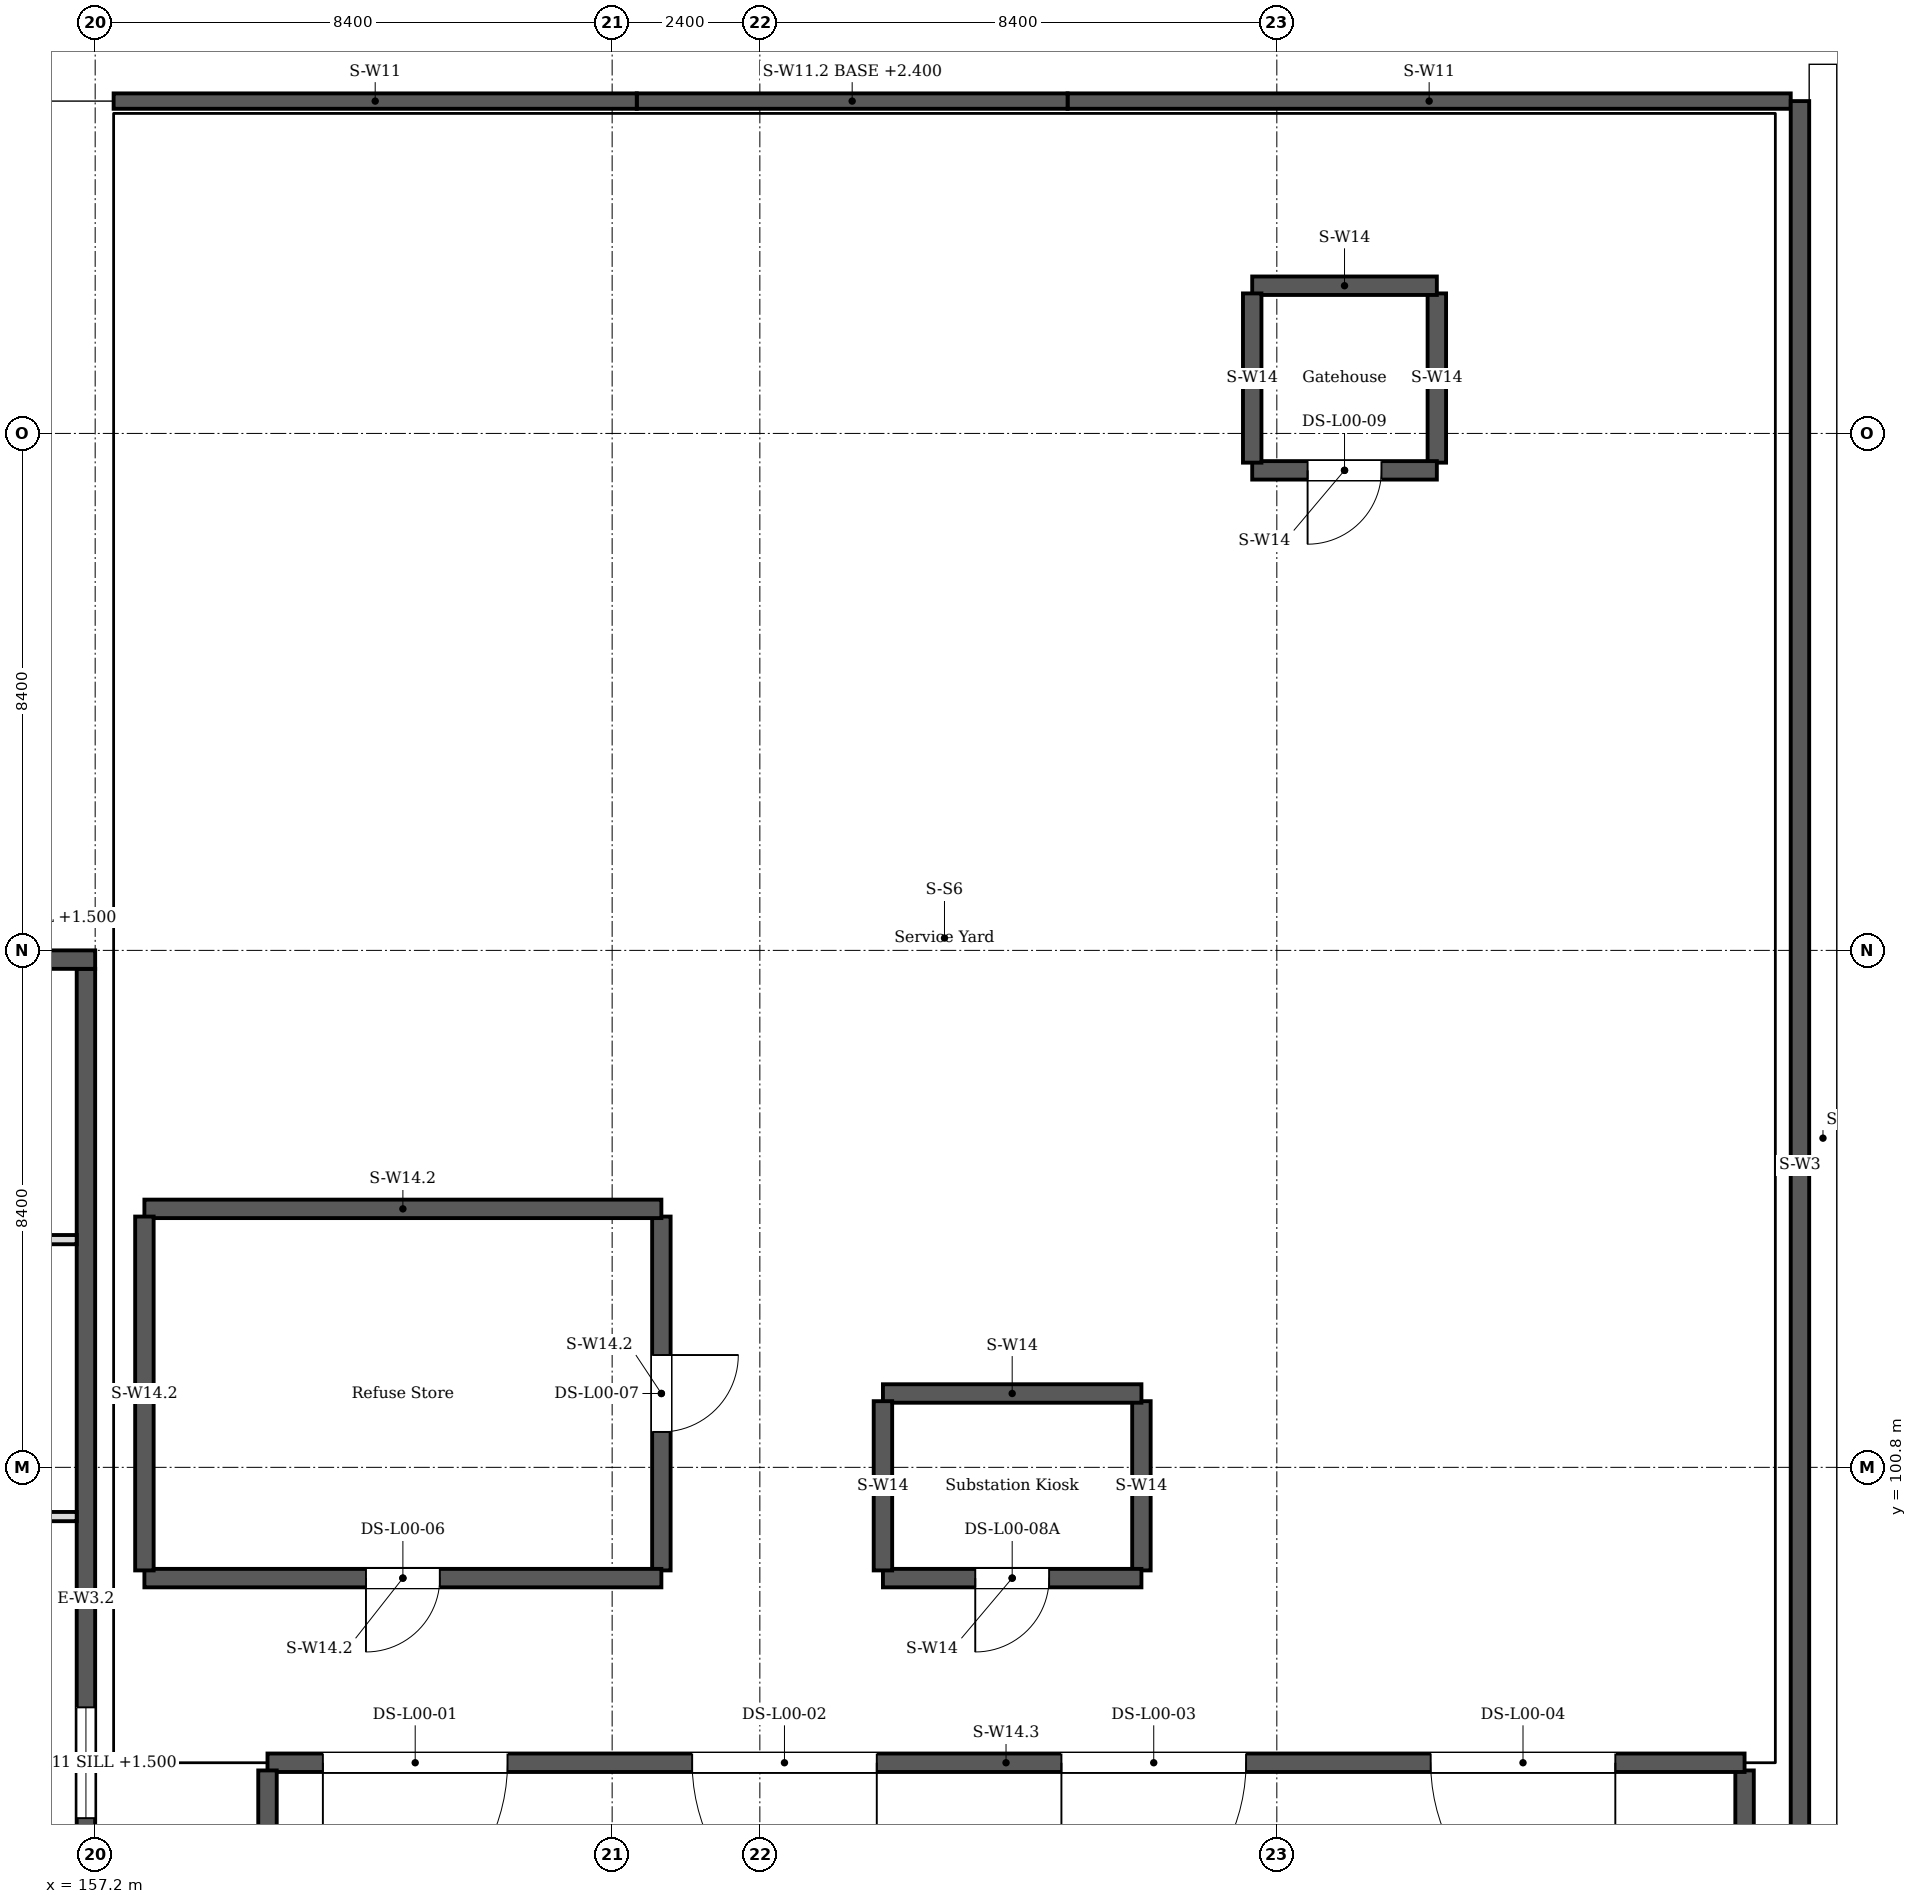
"""IFC4 building model, lengths in metres.
Left out: names, types, materials, properties, quantities, classifications, styles, units other than length and angle.
Written with IfcOpenShell. Run it as: python <this file> out.ifc"""

import sys

from ifc_helpers import new_model, si_unit, direction, frame, frame_2d, origin, place, context, subcontext, project, spatial, rectangle, extrude, element, fill, save


model = new_model("IFC4")
c1 = context("Model", 3, precision=1e-05, world=origin(), true_north=direction((0.0, 1.0)))
c2 = subcontext(c1, "Body", "Model", "MODEL_VIEW")
j1 = project(units=[si_unit("LENGTHUNIT", "METRE"), si_unit("PLANEANGLEUNIT", "RADIAN")], contexts=[c1])
p1 = place(None, origin())
s1 = spatial("IfcSite", under=j1, at=p1, CompositionType="ELEMENT")
p2 = place(p1, origin())
s2 = spatial("IfcBuilding", under=s1, at=p2, CompositionType="ELEMENT")
p3 = place(p2, origin())
s3 = spatial("IfcBuildingStorey", under=s2, at=p3, CompositionType="ELEMENT", Elevation=0.0)
p4 = place(p3, frame((184.9, 88.2, -1.2), z_axis=(0.0, 0.0, 1.0), x_axis=(0.0, 1.0, 0.0)))
e1 = element("IfcWall", 1, at=p4, inside=s3, PredefinedType="SOLIDWALL", context=c2, shape_type="SweptSolid", body=[
    extrude(rectangle(XDim=34.8, YDim=0.3, at=frame_2d((17.4, 0.0))), origin(), (0.0, 0.0, 1.0), 1.2),
])
p5 = place(p3, frame((160.0, 96.0, 0.0), z_axis=(0.0, 0.0, 1.0), x_axis=(1.0, 0.0, 0.0)))
e2 = element("IfcWall", 2, at=p5, inside=s3, PredefinedType="SOLIDWALL", context=c2, shape_type="SweptSolid", body=[
    extrude(rectangle(XDim=24.0, YDim=0.3, at=frame_2d((12.0, 0.0))), origin(), (0.0, 0.0, 1.0), 5.75),
])
p6 = place(p5, frame((0.9, 0.0, 0.0)))
e3 = element("IfcOpeningElement", 3, at=p6, cuts=e2, PredefinedType="OPENING", context=c2, shape_type="SweptSolid", body=[
    extrude(rectangle(XDim=3.0, YDim=3.6, at=frame_2d((1.5, 1.8))), frame((0.0, 0.16, 0.0), z_axis=(0.0, -1.0, 0.0), x_axis=(1.0, 0.0, 0.0)), (0.0, 0.0, 1.0), 0.32),
])
p7 = place(p5, frame((6.9, 0.0, 0.0)))
e4 = element("IfcOpeningElement", 4, at=p7, cuts=e2, PredefinedType="OPENING", context=c2, shape_type="SweptSolid", body=[
    extrude(rectangle(XDim=3.0, YDim=3.6, at=frame_2d((1.5, 1.8))), frame((0.0, 0.16, 0.0), z_axis=(0.0, -1.0, 0.0), x_axis=(1.0, 0.0, 0.0)), (0.0, 0.0, 1.0), 0.32),
])
p8 = place(p5, frame((12.9, 0.0, 0.0)))
e5 = element("IfcOpeningElement", 5, at=p8, cuts=e2, PredefinedType="OPENING", context=c2, shape_type="SweptSolid", body=[
    extrude(rectangle(XDim=3.0, YDim=3.6, at=frame_2d((1.5, 1.8))), frame((0.0, 0.16, 0.0), z_axis=(0.0, -1.0, 0.0), x_axis=(1.0, 0.0, 0.0)), (0.0, 0.0, 1.0), 0.32),
])
p9 = place(p5, frame((18.9, 0.0, 0.0)))
e6 = element("IfcOpeningElement", 6, at=p9, cuts=e2, PredefinedType="OPENING", context=c2, shape_type="SweptSolid", body=[
    extrude(rectangle(XDim=3.0, YDim=3.6, at=frame_2d((1.5, 1.8))), frame((0.0, 0.16, 0.0), z_axis=(0.0, -1.0, 0.0), x_axis=(1.0, 0.0, 0.0)), (0.0, 0.0, 1.0), 0.32),
])
p10 = place(p3, frame((160.0, 84.125, 0.0), z_axis=(0.0, 0.0, 1.0), x_axis=(0.0, 1.0, 0.0)))
e7 = element("IfcWall", 7, at=p10, inside=s3, PredefinedType="SOLIDWALL", context=c2, shape_type="SweptSolid", body=[
    extrude(rectangle(XDim=11.75, YDim=0.3, at=frame_2d((5.875, 0.0))), origin(), (0.0, 0.0, 1.0), 5.75),
])
p11 = place(p10, frame((5.25, 0.0, 0.0)))
e8 = element("IfcOpeningElement", 8, at=p11, cuts=e7, PredefinedType="OPENING", context=c2, shape_type="SweptSolid", body=[
    extrude(rectangle(XDim=1.25, YDim=2.1, at=frame_2d((0.625, 1.05))), frame((0.0, 0.16, 0.0), z_axis=(0.0, -1.0, 0.0), x_axis=(1.0, 0.0, 0.0)), (0.0, 0.0, 1.0), 0.32),
])
p12 = place(p3, frame((184.0, 84.125, 0.0), z_axis=(0.0, 0.0, 1.0), x_axis=(0.0, 1.0, 0.0)))
e9 = element("IfcWall", 9, at=p12, inside=s3, PredefinedType="SOLIDWALL", context=c2, shape_type="SweptSolid", body=[
    extrude(rectangle(XDim=11.75, YDim=0.3, at=frame_2d((5.875, 0.0))), origin(), (0.0, 0.0, 1.0), 5.75),
])
p13 = place(p3, frame((158.0, 99.0, 0.0), z_axis=(0.0, 0.0, 1.0), x_axis=(1.0, 0.0, 0.0)))
e10 = element("IfcWall", 10, at=p13, inside=s3, PredefinedType="SOLIDWALL", context=c2, shape_type="SweptSolid", body=[
    extrude(rectangle(XDim=8.4, YDim=0.3, at=frame_2d((4.2, 0.0))), origin(), (0.0, 0.0, 1.0), 3.4),
])
p14 = place(p13, frame((3.6, 0.0, 0.0)))
e11 = element("IfcOpeningElement", 11, at=p14, cuts=e10, PredefinedType="OPENING", context=c2, shape_type="SweptSolid", body=[
    extrude(rectangle(XDim=1.2, YDim=2.4, at=frame_2d((0.6, 1.2))), frame((0.0, 0.16, 0.0), z_axis=(0.0, -1.0, 0.0), x_axis=(1.0, 0.0, 0.0)), (0.0, 0.0, 1.0), 0.32),
])
p15 = place(p3, frame((158.0, 105.0, 0.0), z_axis=(0.0, 0.0, 1.0), x_axis=(1.0, 0.0, 0.0)))
e12 = element("IfcWall", 12, at=p15, inside=s3, PredefinedType="SOLIDWALL", context=c2, shape_type="SweptSolid", body=[
    extrude(rectangle(XDim=8.4, YDim=0.3, at=frame_2d((4.2, 0.0))), origin(), (0.0, 0.0, 1.0), 3.4),
])
p16 = place(p3, frame((158.0, 99.125, 0.0), z_axis=(0.0, 0.0, 1.0), x_axis=(0.0, 1.0, 0.0)))
e13 = element("IfcWall", 13, at=p16, inside=s3, PredefinedType="SOLIDWALL", context=c2, shape_type="SweptSolid", body=[
    extrude(rectangle(XDim=5.75, YDim=0.3, at=frame_2d((2.875, 0.0))), origin(), (0.0, 0.0, 1.0), 3.4),
])
p17 = place(p3, frame((166.4, 99.125, 0.0), z_axis=(0.0, 0.0, 1.0), x_axis=(0.0, 1.0, 0.0)))
e14 = element("IfcWall", 14, at=p17, inside=s3, PredefinedType="SOLIDWALL", context=c2, shape_type="SweptSolid", body=[
    extrude(rectangle(XDim=5.75, YDim=0.3, at=frame_2d((2.875, 0.0))), origin(), (0.0, 0.0, 1.0), 3.4),
])
p18 = place(p17, frame((2.25, 0.0, 0.0)))
e15 = element("IfcOpeningElement", 15, at=p18, cuts=e14, PredefinedType="OPENING", context=c2, shape_type="SweptSolid", body=[
    extrude(rectangle(XDim=1.25, YDim=2.1, at=frame_2d((0.625, 1.05))), frame((0.0, 0.16, 0.0), z_axis=(0.0, -1.0, 0.0), x_axis=(1.0, 0.0, 0.0)), (0.0, 0.0, 1.0), 0.32),
])
p19 = place(p3, frame((170.0, 99.0, 0.0), z_axis=(0.0, 0.0, 1.0), x_axis=(1.0, 0.0, 0.0)))
e16 = element("IfcWall", 16, at=p19, inside=s3, PredefinedType="SOLIDWALL", context=c2, shape_type="SweptSolid", body=[
    extrude(rectangle(XDim=4.2, YDim=0.3, at=frame_2d((2.1, 0.0))), origin(), (0.0, 0.0, 1.0), 2.8),
])
p20 = place(p19, frame((1.5, 0.0, 0.0)))
e17 = element("IfcOpeningElement", 17, at=p20, cuts=e16, PredefinedType="OPENING", context=c2, shape_type="SweptSolid", body=[
    extrude(rectangle(XDim=1.2, YDim=2.4, at=frame_2d((0.6, 1.2))), frame((0.0, 0.16, 0.0), z_axis=(0.0, -1.0, 0.0), x_axis=(1.0, 0.0, 0.0)), (0.0, 0.0, 1.0), 0.32),
])
p21 = place(p3, frame((170.0, 102.0, 0.0), z_axis=(0.0, 0.0, 1.0), x_axis=(1.0, 0.0, 0.0)))
e18 = element("IfcWall", 18, at=p21, inside=s3, PredefinedType="SOLIDWALL", context=c2, shape_type="SweptSolid", body=[
    extrude(rectangle(XDim=4.2, YDim=0.3, at=frame_2d((2.1, 0.0))), origin(), (0.0, 0.0, 1.0), 2.8),
])
for number, where, z_axis, x_axis in (
    (19, (170.0, 99.125, 0.0), (0.0, 0.0, 1.0), (0.0, 1.0, 0.0)),
    (20, (174.2, 99.125, 0.0), (0.0, 0.0, 1.0), (0.0, 1.0, 0.0)),
):
    element("IfcWall", number, at=place(p3, frame(where, z_axis=z_axis, x_axis=x_axis)), inside=s3, PredefinedType="SOLIDWALL", context=c2, shape_type="SweptSolid", body=[
        extrude(rectangle(XDim=2.75, YDim=0.3, at=frame_2d((1.375, 0.0))), origin(), (0.0, 0.0, 1.0), 2.8),
    ])
p22 = place(p3, frame((176.0, 117.0, 0.0), z_axis=(0.0, 0.0, 1.0), x_axis=(1.0, 0.0, 0.0)))
e21 = element("IfcWall", 21, at=p22, inside=s3, PredefinedType="SOLIDWALL", context=c2, shape_type="SweptSolid", body=[
    extrude(rectangle(XDim=3.0, YDim=0.3, at=frame_2d((1.5, 0.0))), origin(), (0.0, 0.0, 1.0), 2.8),
])
p23 = place(p22, frame((0.9, 0.0, 0.0)))
e22 = element("IfcOpeningElement", 22, at=p23, cuts=e21, PredefinedType="OPENING", context=c2, shape_type="SweptSolid", body=[
    extrude(rectangle(XDim=1.2, YDim=2.1, at=frame_2d((0.6, 1.05))), frame((0.0, 0.16, 0.0), z_axis=(0.0, -1.0, 0.0), x_axis=(1.0, 0.0, 0.0)), (0.0, 0.0, 1.0), 0.32),
])
p24 = place(p3, frame((176.0, 120.0, 0.0), z_axis=(0.0, 0.0, 1.0), x_axis=(1.0, 0.0, 0.0)))
e23 = element("IfcWall", 23, at=p24, inside=s3, PredefinedType="SOLIDWALL", context=c2, shape_type="SweptSolid", body=[
    extrude(rectangle(XDim=3.0, YDim=0.3, at=frame_2d((1.5, 0.0))), origin(), (0.0, 0.0, 1.0), 2.8),
])
for number, where, z_axis, x_axis in (
    (24, (176.0, 117.125, 0.0), (0.0, 0.0, 1.0), (0.0, 1.0, 0.0)),
    (25, (179.0, 117.125, 0.0), (0.0, 0.0, 1.0), (0.0, 1.0, 0.0)),
):
    element("IfcWall", number, at=place(p3, frame(where, z_axis=z_axis, x_axis=x_axis)), inside=s3, PredefinedType="SOLIDWALL", context=c2, shape_type="SweptSolid", body=[
        extrude(rectangle(XDim=2.75, YDim=0.3, at=frame_2d((1.375, 0.0))), origin(), (0.0, 0.0, 1.0), 2.8),
    ])
p25 = place(p3, frame((157.5, 123.0, -0.6), z_axis=(0.0, 0.0, 1.0), x_axis=(1.0, 0.0, 0.0)))
e26 = element("IfcWall", 26, at=p25, inside=s3, PredefinedType="SOLIDWALL", context=c2, shape_type="SweptSolid", body=[
    extrude(rectangle(XDim=8.5, YDim=0.25, at=frame_2d((4.25, 0.0))), origin(), (0.0, 0.0, 1.0), 3.0),
])
p26 = place(p3, frame((173.0, 123.0, -0.6), z_axis=(0.0, 0.0, 1.0), x_axis=(1.0, 0.0, 0.0)))
e27 = element("IfcWall", 27, at=p26, inside=s3, PredefinedType="SOLIDWALL", context=c2, shape_type="SweptSolid", body=[
    extrude(rectangle(XDim=11.75, YDim=0.25, at=frame_2d((5.875, 0.0))), origin(), (0.0, 0.0, 1.0), 3.0),
])
p27 = place(p3, frame((166.0, 123.0, 2.4), z_axis=(0.0, 0.0, 1.0), x_axis=(1.0, 0.0, 0.0)))
e28 = element("IfcWall", 28, at=p27, inside=s3, PredefinedType="SOLIDWALL", context=c2, shape_type="SweptSolid", body=[
    extrude(rectangle(XDim=7.0, YDim=0.25, at=frame_2d((3.5, 0.0))), origin(), (0.0, 0.0, 1.0), 0.6),
])
p28 = place(p3, frame((157.05, 84.0, 0.0), z_axis=(0.0, 0.0, 1.0), x_axis=(0.0, 1.0, 0.0)))
e29 = element("IfcWall", 29, at=p28, inside=s3, PredefinedType="SOLIDWALL", context=c2, shape_type="SweptSolid", body=[
    extrude(rectangle(XDim=24.9, YDim=0.3, at=frame_2d((12.45, 0.0))), origin(), (0.0, 0.0, 1.0), 5.72),
])
p29 = place(p28, frame((3.1, 0.0, 1.5)))
e30 = element("IfcOpeningElement", 30, at=p29, cuts=e29, PredefinedType="OPENING", context=c2, shape_type="SweptSolid", body=[
    extrude(rectangle(XDim=1.8, YDim=1.2, at=frame_2d((0.9, 0.6))), frame((0.0, 0.16, 0.0), z_axis=(0.0, -1.0, 0.0), x_axis=(1.0, 0.0, 0.0)), (0.0, 0.0, 1.0), 0.32),
])
p30 = place(p28, frame((11.1, 0.0, 1.5)))
e31 = element("IfcOpeningElement", 31, at=p30, cuts=e29, PredefinedType="OPENING", context=c2, shape_type="SweptSolid", body=[
    extrude(rectangle(XDim=1.8, YDim=1.2, at=frame_2d((0.9, 0.6))), frame((0.0, 0.16, 0.0), z_axis=(0.0, -1.0, 0.0), x_axis=(1.0, 0.0, 0.0)), (0.0, 0.0, 1.0), 0.32),
])
p31 = place(p3, frame((151.2, 109.05, 0.0), z_axis=(0.0, 0.0, 1.0), x_axis=(1.0, 0.0, 0.0)))
e32 = element("IfcWall", 32, at=p31, inside=s3, PredefinedType="SOLIDWALL", context=c2, shape_type="SweptSolid", body=[
    extrude(rectangle(XDim=6.0, YDim=0.3, at=frame_2d((3.0, 0.0))), origin(), (0.0, 0.0, 1.0), 5.72),
])
p32 = place(p31, frame((0.6, 0.0, 1.5)))
e33 = element("IfcOpeningElement", 33, at=p32, cuts=e32, PredefinedType="OPENING", context=c2, shape_type="SweptSolid", body=[
    extrude(rectangle(XDim=1.2, YDim=1.2, at=frame_2d((0.6, 0.6))), frame((0.0, 0.16, 0.0), z_axis=(0.0, -1.0, 0.0), x_axis=(1.0, 0.0, 0.0)), (0.0, 0.0, 1.0), 0.32),
])
p33 = place(p31, frame((3.7, 0.0, 1.5)))
e34 = element("IfcOpeningElement", 34, at=p33, cuts=e32, PredefinedType="OPENING", context=c2, shape_type="SweptSolid", body=[
    extrude(rectangle(XDim=1.2, YDim=1.2, at=frame_2d((0.6, 0.6))), frame((0.0, 0.16, 0.0), z_axis=(0.0, -1.0, 0.0), x_axis=(1.0, 0.0, 0.0)), (0.0, 0.0, 1.0), 0.32),
])
for number, where, z_axis, x_axis in (
    (35, (153.6, 100.0, 0.0), (0.0, 0.0, 1.0), (1.0, 0.0, 0.0)),
    (36, (153.6, 104.5, 0.0), (0.0, 0.0, 1.0), (1.0, 0.0, 0.0)),
):
    element("IfcWall", number, at=place(p3, frame(where, z_axis=z_axis, x_axis=x_axis)), inside=s3, PredefinedType="PARTITIONING", context=c2, shape_type="SweptSolid", body=[
        extrude(rectangle(XDim=3.3, YDim=0.15, at=frame_2d((1.65, 0.0))), origin(), (0.0, 0.0, 1.0), 5.72),
    ])
p34 = place(p6, origin())
e37 = element("IfcDoor", 37, at=p34, inside=s3, OperationType="ROLLINGUP", PredefinedType="DOOR", context=c2, shape_type="SweptSolid", body=[
    extrude(rectangle(XDim=3.0, YDim=3.6, at=frame_2d((1.5, 1.8))), frame((0.0, 0.025, 0.0), z_axis=(0.0, -1.0, 0.0), x_axis=(1.0, 0.0, 0.0)), (0.0, 0.0, 1.0), 0.05),
])
fill(e3, e37)
p35 = place(p7, origin())
e38 = element("IfcDoor", 38, at=p35, inside=s3, OperationType="ROLLINGUP", PredefinedType="DOOR", context=c2, shape_type="SweptSolid", body=[
    extrude(rectangle(XDim=3.0, YDim=3.6, at=frame_2d((1.5, 1.8))), frame((0.0, 0.025, 0.0), z_axis=(0.0, -1.0, 0.0), x_axis=(1.0, 0.0, 0.0)), (0.0, 0.0, 1.0), 0.05),
])
fill(e4, e38)
p36 = place(p8, origin())
e39 = element("IfcDoor", 39, at=p36, inside=s3, OperationType="ROLLINGUP", PredefinedType="DOOR", context=c2, shape_type="SweptSolid", body=[
    extrude(rectangle(XDim=3.0, YDim=3.6, at=frame_2d((1.5, 1.8))), frame((0.0, 0.025, 0.0), z_axis=(0.0, -1.0, 0.0), x_axis=(1.0, 0.0, 0.0)), (0.0, 0.0, 1.0), 0.05),
])
fill(e5, e39)
p37 = place(p9, origin())
e40 = element("IfcDoor", 40, at=p37, inside=s3, OperationType="ROLLINGUP", PredefinedType="DOOR", context=c2, shape_type="SweptSolid", body=[
    extrude(rectangle(XDim=3.0, YDim=3.6, at=frame_2d((1.5, 1.8))), frame((0.0, 0.025, 0.0), z_axis=(0.0, -1.0, 0.0), x_axis=(1.0, 0.0, 0.0)), (0.0, 0.0, 1.0), 0.05),
])
fill(e6, e40)
p38 = place(p14, origin())
e41 = element("IfcDoor", 41, at=p38, inside=s3, OperationType="SINGLE_SWING_LEFT", PredefinedType="DOOR", context=c2, shape_type="SweptSolid", body=[
    extrude(rectangle(XDim=1.2, YDim=2.4, at=frame_2d((0.6, 1.2))), frame((0.0, 0.025, 0.0), z_axis=(0.0, -1.0, 0.0), x_axis=(1.0, 0.0, 0.0)), (0.0, 0.0, 1.0), 0.05),
])
fill(e11, e41)
p39 = place(p18, origin())
e42 = element("IfcDoor", 42, at=p39, inside=s3, OperationType="SINGLE_SWING_RIGHT", PredefinedType="DOOR", context=c2, shape_type="SweptSolid", body=[
    extrude(rectangle(XDim=1.25, YDim=2.1, at=frame_2d((0.625, 1.05))), frame((0.0, 0.025, 0.0), z_axis=(0.0, -1.0, 0.0), x_axis=(1.0, 0.0, 0.0)), (0.0, 0.0, 1.0), 0.05),
])
fill(e15, e42)
p40 = place(p20, origin())
e43 = element("IfcDoor", 43, at=p40, inside=s3, OperationType="SINGLE_SWING_LEFT", PredefinedType="DOOR", context=c2, shape_type="SweptSolid", body=[
    extrude(rectangle(XDim=1.2, YDim=2.4, at=frame_2d((0.6, 1.2))), frame((0.0, 0.025, 0.0), z_axis=(0.0, -1.0, 0.0), x_axis=(1.0, 0.0, 0.0)), (0.0, 0.0, 1.0), 0.05),
])
fill(e17, e43)
p41 = place(p23, origin())
e44 = element("IfcDoor", 44, at=p41, inside=s3, OperationType="SINGLE_SWING_LEFT", PredefinedType="DOOR", context=c2, shape_type="SweptSolid", body=[
    extrude(rectangle(XDim=1.2, YDim=2.1, at=frame_2d((0.6, 1.05))), frame((0.0, 0.025, 0.0), z_axis=(0.0, -1.0, 0.0), x_axis=(1.0, 0.0, 0.0)), (0.0, 0.0, 1.0), 0.05),
])
fill(e22, e44)
p42 = place(p30, origin())
e45 = element("IfcWindow", 45, at=p42, inside=s3, PartitioningType="SINGLE_PANEL", PredefinedType="WINDOW", context=c2, shape_type="SweptSolid", body=[
    extrude(rectangle(XDim=1.8, YDim=1.2, at=frame_2d((0.9, 0.6))), frame((0.0, 0.03, 0.0), z_axis=(0.0, -1.0, 0.0), x_axis=(1.0, 0.0, 0.0)), (0.0, 0.0, 1.0), 0.06),
])
fill(e31, e45)
save(model, sys.argv[1])
